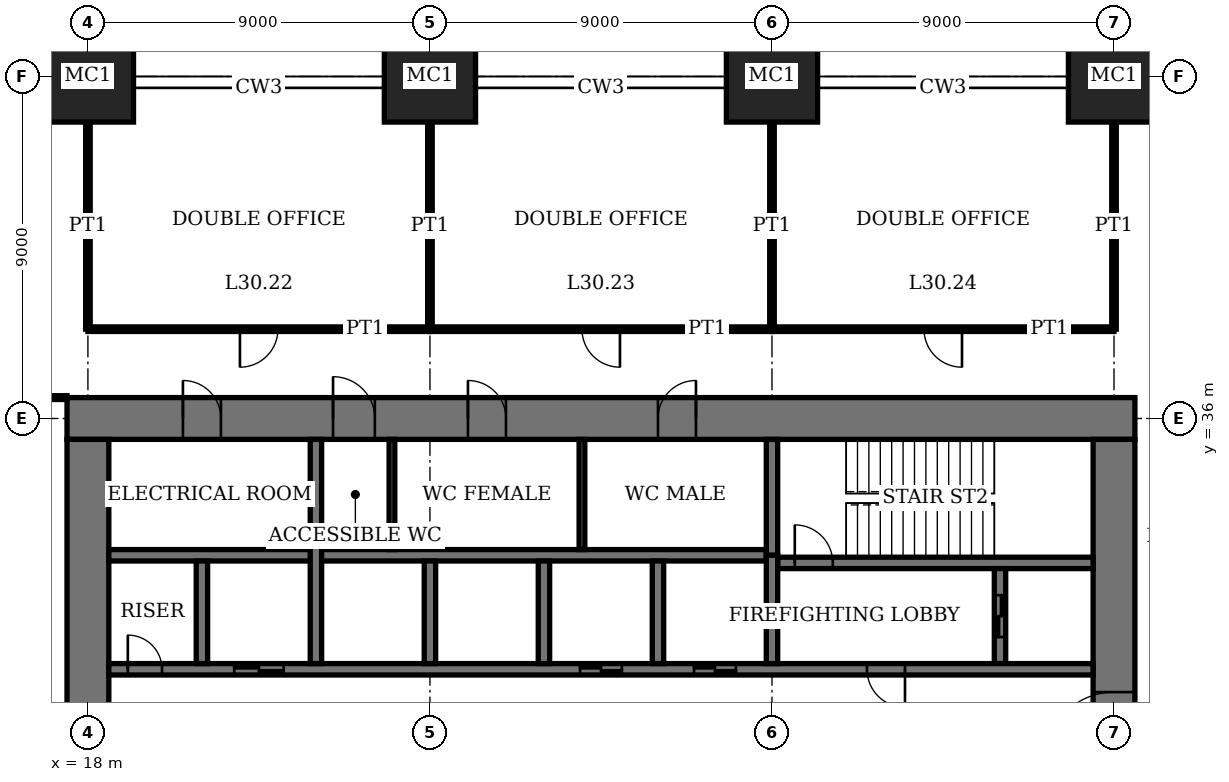
"""IFC4 building model, lengths in metres.
Left out: names, types, materials, properties, quantities, classifications, styles, units other than length and angle.
Written with IfcOpenShell. Run it as: python <this file> out.ifc"""

import sys

from ifc_helpers import new_model, si_unit, direction, frame, frame_2d, origin, origin_2d, place, context, subcontext, project, spatial, rectangle, extrude, element, fill, save


model = new_model("IFC4")
c1 = context("Model", 3, precision=1e-05, world=origin(), true_north=direction((0.0, 1.0)))
c2 = subcontext(c1, "Body", "Model", "MODEL_VIEW")
j1 = project(units=[si_unit("LENGTHUNIT", "METRE"), si_unit("PLANEANGLEUNIT", "RADIAN")], contexts=[c1])
p1 = place(None, origin())
s1 = spatial("IfcSite", under=j1, at=p1, CompositionType="ELEMENT")
p2 = place(p1, origin())
s2 = spatial("IfcBuilding", under=s1, at=p2, CompositionType="ELEMENT")
p3 = place(p2, frame((0.0, 0.0, 125.0)))
s3 = spatial("IfcBuildingStorey", under=s2, at=p3, CompositionType="ELEMENT", Elevation=125.0)
for number, where, z_axis, x_axis in (
    (1, (18.0, 45.0, 0.0), (0.0, 0.0, 1.0), (1.0, 0.0, 0.0)),
    (2, (27.0, 45.0, 0.0), (0.0, 0.0, 1.0), (1.0, 0.0, 0.0)),
    (3, (36.0, 45.0, 0.0), (0.0, 0.0, 1.0), (1.0, 0.0, 0.0)),
    (4, (45.0, 45.0, 0.0), (0.0, 0.0, 1.0), (1.0, 0.0, 0.0)),
):
    element("IfcColumn", number, at=place(p3, frame(where, z_axis=z_axis, x_axis=x_axis)), inside=s3, PredefinedType="COLUMN", context=c2, shape_type="SweptSolid", body=[
        extrude(rectangle(XDim=2.4, YDim=2.4, at=origin_2d()), origin(), (0.0, 0.0, 1.0), 4.0),
    ])
p4 = place(p3, frame((45.55, 36.0, 0.0), z_axis=(0.0, 0.0, 1.0), x_axis=(-1.0, 0.0, 0.0)))
e5 = element("IfcWall", 5, at=p4, inside=s3, PredefinedType="SHEAR", context=c2, shape_type="SweptSolid", body=[
    extrude(rectangle(XDim=28.1, YDim=1.1, at=frame_2d((14.05, 0.0))), origin(), (0.0, 0.0, 1.0), 4.0),
])
p5 = place(p4, frame((11.55, 0.0, 0.0)))
e6 = element("IfcOpeningElement", 6, at=p5, cuts=e5, PredefinedType="OPENING", context=c2, shape_type="SweptSolid", body=[
    extrude(rectangle(XDim=1.0, YDim=2.4, at=frame_2d((0.5, 1.2))), frame((0.0, 0.56, 0.0), z_axis=(0.0, -1.0, 0.0), x_axis=(1.0, 0.0, 0.0)), (0.0, 0.0, 1.0), 1.12),
])
p6 = place(p4, frame((16.55, 0.0, 0.0)))
e7 = element("IfcOpeningElement", 7, at=p6, cuts=e5, PredefinedType="OPENING", context=c2, shape_type="SweptSolid", body=[
    extrude(rectangle(XDim=1.0, YDim=2.4, at=frame_2d((0.5, 1.2))), frame((0.0, 0.56, 0.0), z_axis=(0.0, -1.0, 0.0), x_axis=(1.0, 0.0, 0.0)), (0.0, 0.0, 1.0), 1.12),
])
p7 = place(p4, frame((20.0, 0.0, 0.0)))
e8 = element("IfcOpeningElement", 8, at=p7, cuts=e5, PredefinedType="OPENING", context=c2, shape_type="SweptSolid", body=[
    extrude(rectangle(XDim=1.1, YDim=2.4, at=frame_2d((0.55, 1.2))), frame((0.0, 0.56, 0.0), z_axis=(0.0, -1.0, 0.0), x_axis=(1.0, 0.0, 0.0)), (0.0, 0.0, 1.0), 1.12),
])
p8 = place(p4, frame((24.05, 0.0, 0.0)))
e9 = element("IfcOpeningElement", 9, at=p8, cuts=e5, PredefinedType="OPENING", context=c2, shape_type="SweptSolid", body=[
    extrude(rectangle(XDim=1.0, YDim=2.4, at=frame_2d((0.5, 1.2))), frame((0.0, 0.56, 0.0), z_axis=(0.0, -1.0, 0.0), x_axis=(1.0, 0.0, 0.0)), (0.0, 0.0, 1.0), 1.12),
])
p9 = place(p3, frame((18.0, 35.45, 0.0), z_axis=(0.0, 0.0, 1.0), x_axis=(0.0, -1.0, 0.0)))
e10 = element("IfcWall", 10, at=p9, inside=s3, PredefinedType="SHEAR", context=c2, shape_type="SweptSolid", body=[
    extrude(rectangle(XDim=16.9, YDim=1.1, at=frame_2d((8.45, 0.0))), origin(), (0.0, 0.0, 1.0), 4.0),
])
p10 = place(p9, frame((8.45, 0.0, 0.0)))
e11 = element("IfcOpeningElement", 11, at=p10, cuts=e10, PredefinedType="OPENING", context=c2, shape_type="SweptSolid", body=[
    extrude(rectangle(XDim=1.8, YDim=2.4, at=frame_2d((0.9, 1.2))), frame((0.0, 0.56, 0.0), z_axis=(0.0, -1.0, 0.0), x_axis=(1.0, 0.0, 0.0)), (0.0, 0.0, 1.0), 1.12),
])
p11 = place(p3, frame((45.0, 18.55, 0.0), z_axis=(0.0, 0.0, 1.0), x_axis=(0.0, 1.0, 0.0)))
e12 = element("IfcWall", 12, at=p11, inside=s3, PredefinedType="SHEAR", context=c2, shape_type="SweptSolid", body=[
    extrude(rectangle(XDim=16.9, YDim=1.1, at=frame_2d((8.45, 0.0))), origin(), (0.0, 0.0, 1.0), 4.0),
])
p12 = place(p11, frame((8.45, 0.0, 0.0)))
e13 = element("IfcOpeningElement", 13, at=p12, cuts=e12, PredefinedType="OPENING", context=c2, shape_type="SweptSolid", body=[
    extrude(rectangle(XDim=1.8, YDim=2.4, at=frame_2d((0.9, 1.2))), frame((0.0, 0.56, 0.0), z_axis=(0.0, -1.0, 0.0), x_axis=(1.0, 0.0, 0.0)), (0.0, 0.0, 1.0), 1.12),
])
p13 = place(p3, frame((36.15, 32.2, 0.0), z_axis=(0.0, 0.0, 1.0), x_axis=(1.0, 0.0, 0.0)))
e14 = element("IfcWall", 14, at=p13, inside=s3, PredefinedType="SHEAR", context=c2, shape_type="SweptSolid", body=[
    extrude(rectangle(XDim=8.3, YDim=0.3, at=frame_2d((4.15, 0.0))), origin(), (0.0, 0.0, 1.0), 4.0),
])
p14 = place(p13, frame((0.45, 0.0, 0.0)))
e15 = element("IfcOpeningElement", 15, at=p14, cuts=e14, PredefinedType="OPENING", context=c2, shape_type="SweptSolid", body=[
    extrude(rectangle(XDim=1.0, YDim=2.4, at=frame_2d((0.5, 1.2))), frame((0.0, 0.16, 0.0), z_axis=(0.0, -1.0, 0.0), x_axis=(1.0, 0.0, 0.0)), (0.0, 0.0, 1.0), 0.32),
])
p15 = place(p3, frame((36.0, 32.4, 0.0), z_axis=(0.0, 0.0, 1.0), x_axis=(0.0, 1.0, 0.0)))
e16 = element("IfcWall", 16, at=p15, inside=s3, PredefinedType="SHEAR", context=c2, shape_type="SweptSolid", body=[
    extrude(rectangle(XDim=3.05, YDim=0.3, at=frame_2d((1.525, 0.0))), origin(), (0.0, 0.0, 1.0), 4.0),
])
p16 = place(p3, frame((42.0, 29.55, 0.0), z_axis=(0.0, 0.0, 1.0), x_axis=(0.0, 1.0, 0.0)))
e17 = element("IfcWall", 17, at=p16, inside=s3, PredefinedType="SHEAR", context=c2, shape_type="SweptSolid", body=[
    extrude(rectangle(XDim=2.5, YDim=0.3, at=frame_2d((1.25, 0.0))), origin(), (0.0, 0.0, 1.0), 4.0),
])
p17 = place(p16, frame((0.7, 0.0, 0.0)))
e18 = element("IfcOpeningElement", 18, at=p17, cuts=e17, PredefinedType="OPENING", context=c2, shape_type="SweptSolid", body=[
    extrude(rectangle(XDim=1.1, YDim=2.4, at=frame_2d((0.55, 1.2))), frame((0.0, 0.16, 0.0), z_axis=(0.0, -1.0, 0.0), x_axis=(1.0, 0.0, 0.0)), (0.0, 0.0, 1.0), 0.32),
])
p18 = place(p3, frame((18.55, 29.4, 0.0), z_axis=(0.0, 0.0, 1.0), x_axis=(1.0, 0.0, 0.0)))
e19 = element("IfcWall", 19, at=p18, inside=s3, PredefinedType="SHEAR", context=c2, shape_type="SweptSolid", body=[
    extrude(rectangle(XDim=25.9, YDim=0.3, at=frame_2d((12.95, 0.0))), origin(), (0.0, 0.0, 1.0), 4.0),
])
p19 = place(p18, frame((19.95, 0.0, 0.0)))
e20 = element("IfcOpeningElement", 20, at=p19, cuts=e19, PredefinedType="OPENING", context=c2, shape_type="SweptSolid", body=[
    extrude(rectangle(XDim=1.0, YDim=2.4, at=frame_2d((0.5, 1.2))), frame((0.0, 0.16, 0.0), z_axis=(0.0, -1.0, 0.0), x_axis=(1.0, 0.0, 0.0)), (0.0, 0.0, 1.0), 0.32),
])
p20 = place(p18, frame((0.5, 0.0, 0.0)))
e21 = element("IfcOpeningElement", 21, at=p20, cuts=e19, PredefinedType="OPENING", context=c2, shape_type="SweptSolid", body=[
    extrude(rectangle(XDim=0.9, YDim=2.1, at=frame_2d((0.45, 1.05))), frame((0.0, 0.16, 0.0), z_axis=(0.0, -1.0, 0.0), x_axis=(1.0, 0.0, 0.0)), (0.0, 0.0, 1.0), 0.32),
])
p21 = place(p18, frame((15.4, 0.0, 0.0)))
e22 = element("IfcOpeningElement", 22, at=p21, cuts=e19, PredefinedType="OPENING", context=c2, shape_type="SweptSolid", body=[
    extrude(rectangle(XDim=1.1, YDim=2.4, at=frame_2d((0.55, 1.2))), frame((0.0, 0.16, 0.0), z_axis=(0.0, -1.0, 0.0), x_axis=(1.0, 0.0, 0.0)), (0.0, 0.0, 1.0), 0.32),
])
p22 = place(p18, frame((12.4, 0.0, 0.0)))
e23 = element("IfcOpeningElement", 23, at=p22, cuts=e19, PredefinedType="OPENING", context=c2, shape_type="SweptSolid", body=[
    extrude(rectangle(XDim=1.1, YDim=2.4, at=frame_2d((0.55, 1.2))), frame((0.0, 0.16, 0.0), z_axis=(0.0, -1.0, 0.0), x_axis=(1.0, 0.0, 0.0)), (0.0, 0.0, 1.0), 0.32),
])
p23 = place(p18, frame((3.3, 0.0, 0.0)))
e24 = element("IfcOpeningElement", 24, at=p23, cuts=e19, PredefinedType="OPENING", context=c2, shape_type="SweptSolid", body=[
    extrude(rectangle(XDim=1.3, YDim=2.4, at=frame_2d((0.65, 1.2))), frame((0.0, 0.16, 0.0), z_axis=(0.0, -1.0, 0.0), x_axis=(1.0, 0.0, 0.0)), (0.0, 0.0, 1.0), 0.32),
])
p24 = place(p3, frame((18.55, 32.4, 0.0), z_axis=(0.0, 0.0, 1.0), x_axis=(1.0, 0.0, 0.0)))
e25 = element("IfcWall", 25, at=p24, inside=s3, PredefinedType="SHEAR", context=c2, shape_type="SweptSolid", body=[
    extrude(rectangle(XDim=17.3, YDim=0.3, at=frame_2d((8.65, 0.0))), origin(), (0.0, 0.0, 1.0), 4.0),
])
for number, where, z_axis, x_axis in (
    (26, (33.0, 29.55, 0.0), (0.0, 0.0, 1.0), (0.0, 1.0, 0.0)),
    (27, (30.0, 29.55, 0.0), (0.0, 0.0, 1.0), (0.0, 1.0, 0.0)),
    (28, (27.0, 29.55, 0.0), (0.0, 0.0, 1.0), (0.0, 1.0, 0.0)),
):
    element("IfcWall", number, at=place(p3, frame(where, z_axis=z_axis, x_axis=x_axis)), inside=s3, PredefinedType="SHEAR", context=c2, shape_type="SweptSolid", body=[
        extrude(rectangle(XDim=2.7, YDim=0.3, at=frame_2d((1.35, 0.0))), origin(), (0.0, 0.0, 1.0), 4.0),
    ])
p25 = place(p3, frame((24.0, 29.55, 0.0), z_axis=(0.0, 0.0, 1.0), x_axis=(0.0, 1.0, 0.0)))
e29 = element("IfcWall", 29, at=p25, inside=s3, PredefinedType="SHEAR", context=c2, shape_type="SweptSolid", body=[
    extrude(rectangle(XDim=5.9, YDim=0.3, at=frame_2d((2.95, 0.0))), origin(), (0.0, 0.0, 1.0), 4.0),
])
p26 = place(p3, frame((21.0, 29.55, 0.0), z_axis=(0.0, 0.0, 1.0), x_axis=(0.0, 1.0, 0.0)))
e30 = element("IfcWall", 30, at=p26, inside=s3, PredefinedType="SHEAR", context=c2, shape_type="SweptSolid", body=[
    extrude(rectangle(XDim=2.7, YDim=0.3, at=frame_2d((1.35, 0.0))), origin(), (0.0, 0.0, 1.0), 4.0),
])
p27 = place(p3, frame((36.0, 29.55, 0.0), z_axis=(0.0, 0.0, 1.0), x_axis=(0.0, 1.0, 0.0)))
e31 = element("IfcWall", 31, at=p27, inside=s3, PredefinedType="SHEAR", context=c2, shape_type="SweptSolid", body=[
    extrude(rectangle(XDim=2.85, YDim=0.3, at=frame_2d((1.425, 0.0))), origin(), (0.0, 0.0, 1.0), 4.0),
])
p28 = place(p3, frame((9.9, 36.55, 0.0), z_axis=(0.0, 0.0, 1.0), x_axis=(1.0, 0.0, 0.0)))
e32 = element("IfcWall", 32, at=p28, inside=s3, PredefinedType="PARTITIONING", context=c2, shape_type="SweptSolid", body=[
    extrude(rectangle(XDim=7.55, YDim=0.1, at=frame_2d((3.775, 0.0))), origin(), (0.0, 0.0, 1.0), 3.75),
])
p29 = place(p3, frame((18.0, 38.35, 0.0), z_axis=(0.0, 0.0, 1.0), x_axis=(1.0, 0.0, 0.0)))
e33 = element("IfcWall", 33, at=p29, inside=s3, PredefinedType="PARTITIONING", context=c2, shape_type="SweptSolid", body=[
    extrude(rectangle(XDim=9.0, YDim=0.12, at=frame_2d((4.5, 0.0))), origin(), (0.0, 0.0, 1.0), 3.75),
])
p30 = place(p29, frame((4.0, 0.0, 0.0)))
e34 = element("IfcOpeningElement", 34, at=p30, cuts=e33, PredefinedType="OPENING", context=c2, shape_type="SweptSolid", body=[
    extrude(rectangle(XDim=1.0, YDim=2.4, at=frame_2d((0.5, 1.2))), frame((0.0, 0.07, 0.0), z_axis=(0.0, -1.0, 0.0), x_axis=(1.0, 0.0, 0.0)), (0.0, 0.0, 1.0), 0.14),
])
p31 = place(p3, frame((27.0, 38.35, 0.0), z_axis=(0.0, 0.0, 1.0), x_axis=(1.0, 0.0, 0.0)))
e35 = element("IfcWall", 35, at=p31, inside=s3, PredefinedType="PARTITIONING", context=c2, shape_type="SweptSolid", body=[
    extrude(rectangle(XDim=9.0, YDim=0.12, at=frame_2d((4.5, 0.0))), origin(), (0.0, 0.0, 1.0), 3.75),
])
p32 = place(p31, frame((4.0, 0.0, 0.0)))
e36 = element("IfcOpeningElement", 36, at=p32, cuts=e35, PredefinedType="OPENING", context=c2, shape_type="SweptSolid", body=[
    extrude(rectangle(XDim=1.0, YDim=2.4, at=frame_2d((0.5, 1.2))), frame((0.0, 0.07, 0.0), z_axis=(0.0, -1.0, 0.0), x_axis=(1.0, 0.0, 0.0)), (0.0, 0.0, 1.0), 0.14),
])
p33 = place(p3, frame((36.0, 38.35, 0.0), z_axis=(0.0, 0.0, 1.0), x_axis=(1.0, 0.0, 0.0)))
e37 = element("IfcWall", 37, at=p33, inside=s3, PredefinedType="PARTITIONING", context=c2, shape_type="SweptSolid", body=[
    extrude(rectangle(XDim=9.0, YDim=0.12, at=frame_2d((4.5, 0.0))), origin(), (0.0, 0.0, 1.0), 3.75),
])
p34 = place(p33, frame((4.0, 0.0, 0.0)))
e38 = element("IfcOpeningElement", 38, at=p34, cuts=e37, PredefinedType="OPENING", context=c2, shape_type="SweptSolid", body=[
    extrude(rectangle(XDim=1.0, YDim=2.4, at=frame_2d((0.5, 1.2))), frame((0.0, 0.07, 0.0), z_axis=(0.0, -1.0, 0.0), x_axis=(1.0, 0.0, 0.0)), (0.0, 0.0, 1.0), 0.14),
])
for number, where, z_axis, x_axis in (
    (39, (18.0, 38.35, 0.0), (0.0, 0.0, 1.0), (0.0, 1.0, 0.0)),
    (40, (27.0, 38.35, 0.0), (0.0, 0.0, 1.0), (0.0, 1.0, 0.0)),
    (41, (36.0, 38.35, 0.0), (0.0, 0.0, 1.0), (0.0, 1.0, 0.0)),
    (42, (45.0, 38.35, 0.0), (0.0, 0.0, 1.0), (0.0, 1.0, 0.0)),
):
    element("IfcWall", number, at=place(p3, frame(where, z_axis=z_axis, x_axis=x_axis)), inside=s3, PredefinedType="PARTITIONING", context=c2, shape_type="SweptSolid", body=[
        extrude(rectangle(XDim=5.45, YDim=0.12, at=frame_2d((2.725, 0.0))), origin(), (0.0, 0.0, 1.0), 3.05),
    ])
for number, where, z_axis, x_axis in (
    (43, (31.0, 32.55, 0.0), (0.0, 0.0, 1.0), (0.0, 1.0, 0.0)),
    (44, (26.0, 32.55, 0.0), (0.0, 0.0, 1.0), (0.0, 1.0, 0.0)),
):
    element("IfcWall", number, at=place(p3, frame(where, z_axis=z_axis, x_axis=x_axis)), inside=s3, PredefinedType="PARTITIONING", context=c2, shape_type="SweptSolid", body=[
        extrude(rectangle(XDim=2.9, YDim=0.15, at=frame_2d((1.45, 0.0))), origin(), (0.0, 0.0, 1.0), 3.75),
    ])
p35 = place(p12, origin())
e45 = element("IfcDoor", 45, at=p35, inside=s3, OperationType="DOUBLE_DOOR_DOUBLE_SWING", PredefinedType="DOOR", context=c2, shape_type="SweptSolid", body=[
    extrude(rectangle(XDim=1.8, YDim=2.4, at=frame_2d((0.9, 1.2))), frame((0.0, 0.03, 0.0), z_axis=(0.0, -1.0, 0.0), x_axis=(1.0, 0.0, 0.0)), (0.0, 0.0, 1.0), 0.06),
    extrude(rectangle(XDim=0.04, YDim=2.4, at=frame_2d((0.02, 1.2))), frame((0.0, 0.55, 0.0), z_axis=(0.0, -1.0, 0.0), x_axis=(1.0, 0.0, 0.0)), (0.0, 0.0, 1.0), 1.1),
    extrude(rectangle(XDim=0.04, YDim=2.4, at=frame_2d((1.78, 1.2))), frame((0.0, 0.55, 0.0), z_axis=(0.0, -1.0, 0.0), x_axis=(1.0, 0.0, 0.0)), (0.0, 0.0, 1.0), 1.1),
    extrude(rectangle(XDim=1.8, YDim=0.04, at=frame_2d((0.9, 2.38))), frame((0.0, 0.55, 0.0), z_axis=(0.0, -1.0, 0.0), x_axis=(1.0, 0.0, 0.0)), (0.0, 0.0, 1.0), 1.1),
])
fill(e13, e45)
p36 = place(p5, origin())
e46 = element("IfcDoor", 46, at=p36, inside=s3, OperationType="SINGLE_SWING_LEFT", PredefinedType="DOOR", context=c2, shape_type="SweptSolid", body=[
    extrude(rectangle(XDim=1.0, YDim=2.4, at=frame_2d((0.5, 1.2))), frame((0.0, 0.025, 0.0), z_axis=(0.0, -1.0, 0.0), x_axis=(1.0, 0.0, 0.0)), (0.0, 0.0, 1.0), 0.05),
    extrude(rectangle(XDim=0.04, YDim=2.4, at=frame_2d((0.02, 1.2))), frame((0.0, 0.4, 0.0), z_axis=(0.0, -1.0, 0.0), x_axis=(1.0, 0.0, 0.0)), (0.0, 0.0, 1.0), 0.8),
    extrude(rectangle(XDim=0.04, YDim=2.4, at=frame_2d((0.98, 1.2))), frame((0.0, 0.4, 0.0), z_axis=(0.0, -1.0, 0.0), x_axis=(1.0, 0.0, 0.0)), (0.0, 0.0, 1.0), 0.8),
    extrude(rectangle(XDim=1.0, YDim=0.04, at=frame_2d((0.5, 2.38))), frame((0.0, 0.4, 0.0), z_axis=(0.0, -1.0, 0.0), x_axis=(1.0, 0.0, 0.0)), (0.0, 0.0, 1.0), 0.8),
])
fill(e6, e46)
p37 = place(p6, origin())
e47 = element("IfcDoor", 47, at=p37, inside=s3, OperationType="SINGLE_SWING_RIGHT", PredefinedType="DOOR", context=c2, shape_type="SweptSolid", body=[
    extrude(rectangle(XDim=1.0, YDim=2.4, at=frame_2d((0.5, 1.2))), frame((0.0, 0.025, 0.0), z_axis=(0.0, -1.0, 0.0), x_axis=(1.0, 0.0, 0.0)), (0.0, 0.0, 1.0), 0.05),
    extrude(rectangle(XDim=0.04, YDim=2.4, at=frame_2d((0.02, 1.2))), frame((0.0, 0.4, 0.0), z_axis=(0.0, -1.0, 0.0), x_axis=(1.0, 0.0, 0.0)), (0.0, 0.0, 1.0), 0.8),
    extrude(rectangle(XDim=0.04, YDim=2.4, at=frame_2d((0.98, 1.2))), frame((0.0, 0.4, 0.0), z_axis=(0.0, -1.0, 0.0), x_axis=(1.0, 0.0, 0.0)), (0.0, 0.0, 1.0), 0.8),
    extrude(rectangle(XDim=1.0, YDim=0.04, at=frame_2d((0.5, 2.38))), frame((0.0, 0.4, 0.0), z_axis=(0.0, -1.0, 0.0), x_axis=(1.0, 0.0, 0.0)), (0.0, 0.0, 1.0), 0.8),
])
fill(e7, e47)
p38 = place(p7, origin())
e48 = element("IfcDoor", 48, at=p38, inside=s3, OperationType="SINGLE_SWING_RIGHT", PredefinedType="DOOR", context=c2, shape_type="SweptSolid", body=[
    extrude(rectangle(XDim=1.1, YDim=2.4, at=frame_2d((0.55, 1.2))), frame((0.0, 0.025, 0.0), z_axis=(0.0, -1.0, 0.0), x_axis=(1.0, 0.0, 0.0)), (0.0, 0.0, 1.0), 0.05),
    extrude(rectangle(XDim=0.04, YDim=2.4, at=frame_2d((0.02, 1.2))), frame((0.0, 0.44, 0.0), z_axis=(0.0, -1.0, 0.0), x_axis=(1.0, 0.0, 0.0)), (0.0, 0.0, 1.0), 0.88),
    extrude(rectangle(XDim=0.04, YDim=2.4, at=frame_2d((1.08, 1.2))), frame((0.0, 0.44, 0.0), z_axis=(0.0, -1.0, 0.0), x_axis=(1.0, 0.0, 0.0)), (0.0, 0.0, 1.0), 0.88),
    extrude(rectangle(XDim=1.1, YDim=0.04, at=frame_2d((0.55, 2.38))), frame((0.0, 0.44, 0.0), z_axis=(0.0, -1.0, 0.0), x_axis=(1.0, 0.0, 0.0)), (0.0, 0.0, 1.0), 0.88),
])
fill(e8, e48)
p39 = place(p8, origin())
e49 = element("IfcDoor", 49, at=p39, inside=s3, OperationType="SINGLE_SWING_RIGHT", PredefinedType="DOOR", context=c2, shape_type="SweptSolid", body=[
    extrude(rectangle(XDim=1.0, YDim=2.4, at=frame_2d((0.5, 1.2))), frame((0.0, 0.025, 0.0), z_axis=(0.0, -1.0, 0.0), x_axis=(1.0, 0.0, 0.0)), (0.0, 0.0, 1.0), 0.05),
    extrude(rectangle(XDim=0.04, YDim=2.4, at=frame_2d((0.02, 1.2))), frame((0.0, 0.4, 0.0), z_axis=(0.0, -1.0, 0.0), x_axis=(1.0, 0.0, 0.0)), (0.0, 0.0, 1.0), 0.8),
    extrude(rectangle(XDim=0.04, YDim=2.4, at=frame_2d((0.98, 1.2))), frame((0.0, 0.4, 0.0), z_axis=(0.0, -1.0, 0.0), x_axis=(1.0, 0.0, 0.0)), (0.0, 0.0, 1.0), 0.8),
    extrude(rectangle(XDim=1.0, YDim=0.04, at=frame_2d((0.5, 2.38))), frame((0.0, 0.4, 0.0), z_axis=(0.0, -1.0, 0.0), x_axis=(1.0, 0.0, 0.0)), (0.0, 0.0, 1.0), 0.8),
])
fill(e9, e49)
p40 = place(p14, origin())
e50 = element("IfcDoor", 50, at=p40, inside=s3, OperationType="SINGLE_SWING_RIGHT", PredefinedType="DOOR", context=c2, shape_type="SweptSolid", body=[
    extrude(rectangle(XDim=1.0, YDim=2.4, at=frame_2d((0.5, 1.2))), frame((0.0, 0.03, 0.0), z_axis=(0.0, -1.0, 0.0), x_axis=(1.0, 0.0, 0.0)), (0.0, 0.0, 1.0), 0.06),
])
fill(e15, e50)
p41 = place(p19, origin())
e51 = element("IfcDoor", 51, at=p41, inside=s3, OperationType="SINGLE_SWING_RIGHT", PredefinedType="DOOR", context=c2, shape_type="SweptSolid", body=[
    extrude(rectangle(XDim=1.0, YDim=2.4, at=frame_2d((0.5, 1.2))), frame((0.0, 0.03, 0.0), z_axis=(0.0, -1.0, 0.0), x_axis=(1.0, 0.0, 0.0)), (0.0, 0.0, 1.0), 0.06),
])
fill(e20, e51)
p42 = place(p20, origin())
e52 = element("IfcDoor", 52, at=p42, inside=s3, OperationType="SINGLE_SWING_RIGHT", PredefinedType="DOOR", context=c2, shape_type="SweptSolid", body=[
    extrude(rectangle(XDim=0.9, YDim=2.1, at=frame_2d((0.45, 1.05))), frame((0.0, 0.03, 0.0), z_axis=(0.0, -1.0, 0.0), x_axis=(1.0, 0.0, 0.0)), (0.0, 0.0, 1.0), 0.06),
])
fill(e21, e52)
p43 = place(p30, origin())
e53 = element("IfcDoor", 53, at=p43, inside=s3, OperationType="SINGLE_SWING_LEFT", PredefinedType="DOOR", context=c2, shape_type="SweptSolid", body=[
    extrude(rectangle(XDim=1.0, YDim=2.4, at=frame_2d((0.5, 1.2))), frame((0.0, 0.025, 0.0), z_axis=(0.0, -1.0, 0.0), x_axis=(1.0, 0.0, 0.0)), (0.0, 0.0, 1.0), 0.05),
])
fill(e34, e53)
p44 = place(p32, origin())
e54 = element("IfcDoor", 54, at=p44, inside=s3, OperationType="SINGLE_SWING_RIGHT", PredefinedType="DOOR", context=c2, shape_type="SweptSolid", body=[
    extrude(rectangle(XDim=1.0, YDim=2.4, at=frame_2d((0.5, 1.2))), frame((0.0, 0.025, 0.0), z_axis=(0.0, -1.0, 0.0), x_axis=(1.0, 0.0, 0.0)), (0.0, 0.0, 1.0), 0.05),
])
fill(e36, e54)
p45 = place(p34, origin())
e55 = element("IfcDoor", 55, at=p45, inside=s3, OperationType="SINGLE_SWING_RIGHT", PredefinedType="DOOR", context=c2, shape_type="SweptSolid", body=[
    extrude(rectangle(XDim=1.0, YDim=2.4, at=frame_2d((0.5, 1.2))), frame((0.0, 0.025, 0.0), z_axis=(0.0, -1.0, 0.0), x_axis=(1.0, 0.0, 0.0)), (0.0, 0.0, 1.0), 0.05),
])
fill(e38, e55)
p46 = place(p21, origin())
e56 = element("IfcDoor", 56, at=p46, inside=s3, OperationType="DOUBLE_DOOR_SLIDING", PredefinedType="DOOR", context=c2, shape_type="SweptSolid", body=[
    extrude(rectangle(XDim=1.1, YDim=2.4, at=frame_2d((0.55, 1.2))), frame((0.0, 0.02, 0.0), z_axis=(0.0, -1.0, 0.0), x_axis=(1.0, 0.0, 0.0)), (0.0, 0.0, 1.0), 0.04),
])
fill(e22, e56)
p47 = place(p22, origin())
e57 = element("IfcDoor", 57, at=p47, inside=s3, OperationType="DOUBLE_DOOR_SLIDING", PredefinedType="DOOR", context=c2, shape_type="SweptSolid", body=[
    extrude(rectangle(XDim=1.1, YDim=2.4, at=frame_2d((0.55, 1.2))), frame((0.0, 0.02, 0.0), z_axis=(0.0, -1.0, 0.0), x_axis=(1.0, 0.0, 0.0)), (0.0, 0.0, 1.0), 0.04),
])
fill(e23, e57)
p48 = place(p23, origin())
e58 = element("IfcDoor", 58, at=p48, inside=s3, OperationType="DOUBLE_DOOR_SLIDING", PredefinedType="DOOR", context=c2, shape_type="SweptSolid", body=[
    extrude(rectangle(XDim=1.3, YDim=2.4, at=frame_2d((0.65, 1.2))), frame((0.0, 0.02, 0.0), z_axis=(0.0, -1.0, 0.0), x_axis=(1.0, 0.0, 0.0)), (0.0, 0.0, 1.0), 0.04),
])
fill(e24, e58)
p49 = place(p17, origin())
e59 = element("IfcDoor", 59, at=p49, inside=s3, OperationType="DOUBLE_DOOR_SLIDING", PredefinedType="DOOR", context=c2, shape_type="SweptSolid", body=[
    extrude(rectangle(XDim=1.1, YDim=2.4, at=frame_2d((0.55, 1.2))), frame((0.0, 0.03, 0.0), z_axis=(0.0, -1.0, 0.0), x_axis=(1.0, 0.0, 0.0)), (0.0, 0.0, 1.0), 0.06),
])
fill(e18, e59)
save(model, sys.argv[1])
